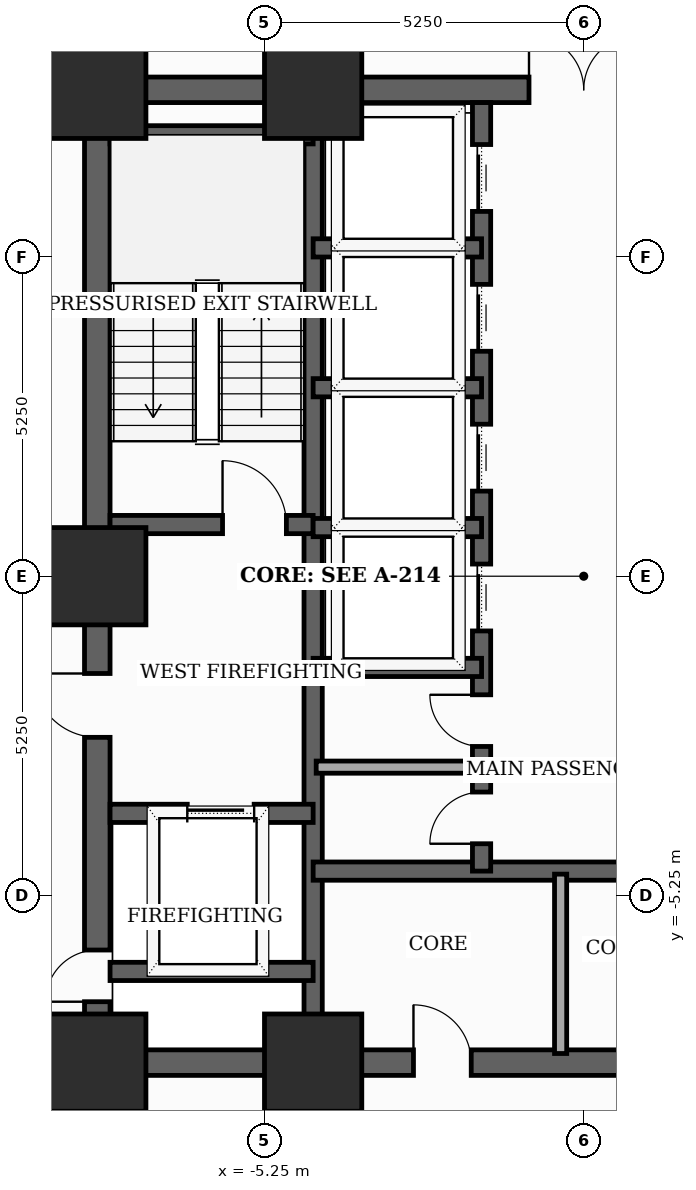
"""IFC4 building model, lengths in metres.
Left out: names, types, materials, properties, quantities, classifications, styles, units other than length and angle.
Written with IfcOpenShell. Run it as: python <this file> out.ifc"""

import sys

from ifc_helpers import new_model, si_unit, direction, frame, frame_2d, origin, origin_2d, place, context, subcontext, project, spatial, rectangle, extrude, element, fill, save


model = new_model("IFC4")
c1 = context("Model", 3, precision=1e-05, world=origin(), true_north=direction((0.0, 1.0)))
c2 = subcontext(c1, "Body", "Model", "MODEL_VIEW")
j1 = project(units=[si_unit("LENGTHUNIT", "METRE"), si_unit("PLANEANGLEUNIT", "RADIAN")], contexts=[c1])
p1 = place(None, origin())
s1 = spatial("IfcSite", under=j1, at=p1, CompositionType="ELEMENT")
p2 = place(p1, origin())
s2 = spatial("IfcBuilding", under=s1, at=p2, CompositionType="ELEMENT")
p3 = place(p2, frame((0.0, 0.0, 66.7)))
s3 = spatial("IfcBuildingStorey", under=s2, at=p3, CompositionType="ELEMENT", Elevation=66.7)
for number, where, z_axis, x_axis in (
    (1, (-8.0, -8.0, 0.0), (0.0, 0.0, 1.0), (1.0, 0.0, 0.0)),
    (2, (-4.45, -8.0, 0.0), (0.0, 0.0, 1.0), (1.0, 0.0, 0.0)),
    (3, (-4.45, 8.0, 0.0), (0.0, 0.0, 1.0), (1.0, 0.0, 0.0)),
    (4, (-8.0, 8.0, 0.0), (0.0, 0.0, 1.0), (1.0, 0.0, 0.0)),
    (5, (-8.0, 0.0, 0.0), (0.0, 0.0, 1.0), (1.0, 0.0, 0.0)),
):
    element("IfcColumn", number, at=place(p3, frame(where, z_axis=z_axis, x_axis=x_axis)), inside=s3, PredefinedType="COLUMN", context=c2, shape_type="SweptSolid", body=[
        extrude(rectangle(XDim=1.6, YDim=1.6, at=origin_2d()), origin(), (0.0, 0.0, 1.0), 3.7),
    ])
p4 = place(p3, frame((-8.0, -8.0, 0.0), z_axis=(0.0, 0.0, 1.0), x_axis=(0.0, 1.0, 0.0)))
e6 = element("IfcWall", 6, at=p4, inside=s3, PredefinedType="SHEAR", context=c2, shape_type="SweptSolid", body=[
    extrude(rectangle(XDim=16.0, YDim=0.42, at=frame_2d((8.0, 0.0))), origin(), (0.0, 0.0, 1.0), 3.5),
])
p5 = place(p4, frame((1.002, 0.0, 0.0)))
e7 = element("IfcOpeningElement", 7, at=p5, cuts=e6, PredefinedType="OPENING", context=c2, shape_type="SweptSolid", body=[
    extrude(rectangle(XDim=0.85, YDim=2.02, at=frame_2d((0.425, 1.01))), frame((0.0, 0.22, 0.0), z_axis=(0.0, -1.0, 0.0), x_axis=(1.0, 0.0, 0.0)), (0.0, 0.0, 1.0), 0.44),
])
p6 = place(p4, frame((5.35, 0.0, 0.0)))
e8 = element("IfcOpeningElement", 8, at=p6, cuts=e6, PredefinedType="OPENING", context=c2, shape_type="SweptSolid", body=[
    extrude(rectangle(XDim=1.05, YDim=2.15, at=frame_2d((0.525, 1.075))), frame((0.0, 0.22, 0.0), z_axis=(0.0, -1.0, 0.0), x_axis=(1.0, 0.0, 0.0)), (0.0, 0.0, 1.0), 0.44),
])
p7 = place(p3, frame((-8.0, -8.0, 0.0), z_axis=(0.0, 0.0, 1.0), x_axis=(1.0, 0.0, 0.0)))
e9 = element("IfcWall", 9, at=p7, inside=s3, PredefinedType="SHEAR", context=c2, shape_type="SweptSolid", body=[
    extrude(rectangle(XDim=16.0, YDim=0.42, at=frame_2d((8.0, 0.0))), origin(), (0.0, 0.0, 1.0), 3.5),
])
p8 = place(p7, frame((5.2, 0.0, 0.0)))
e10 = element("IfcOpeningElement", 10, at=p8, cuts=e9, PredefinedType="OPENING", context=c2, shape_type="SweptSolid", body=[
    extrude(rectangle(XDim=0.95, YDim=2.1, at=frame_2d((0.475, 1.05))), frame((0.0, 0.22, 0.0), z_axis=(0.0, -1.0, 0.0), x_axis=(1.0, 0.0, 0.0)), (0.0, 0.0, 1.0), 0.44),
])
p9 = place(p7, frame((9.8, 0.0, 0.0)))
e11 = element("IfcOpeningElement", 11, at=p9, cuts=e9, PredefinedType="OPENING", context=c2, shape_type="SweptSolid", body=[
    extrude(rectangle(XDim=0.95, YDim=2.1, at=frame_2d((0.475, 1.05))), frame((0.0, 0.22, 0.0), z_axis=(0.0, -1.0, 0.0), x_axis=(1.0, 0.0, 0.0)), (0.0, 0.0, 1.0), 0.44),
])
p10 = place(p3, frame((-8.0, 8.0, 0.0), z_axis=(0.0, 0.0, 1.0), x_axis=(1.0, 0.0, 0.0)))
e12 = element("IfcWall", 12, at=p10, inside=s3, PredefinedType="SHEAR", context=c2, shape_type="SweptSolid", body=[
    extrude(rectangle(XDim=16.0, YDim=0.42, at=frame_2d((8.0, 0.0))), origin(), (0.0, 0.0, 1.0), 3.5),
])
p11 = place(p10, frame((7.1, 0.0, 0.0)))
e13 = element("IfcOpeningElement", 13, at=p11, cuts=e12, PredefinedType="OPENING", context=c2, shape_type="SweptSolid", body=[
    extrude(rectangle(XDim=1.8, YDim=2.15, at=frame_2d((0.9, 1.075))), frame((0.0, 0.22, 0.0), z_axis=(0.0, -1.0, 0.0), x_axis=(1.0, 0.0, 0.0)), (0.0, 0.0, 1.0), 0.44),
])
p12 = place(p3, frame((-4.45, -7.79, 0.0), z_axis=(0.0, 0.0, 1.0), x_axis=(0.0, 1.0, 0.0)))
e14 = element("IfcWall", 14, at=p12, inside=s3, PredefinedType="SHEAR", context=c2, shape_type="SweptSolid", body=[
    extrude(rectangle(XDim=15.58, YDim=0.3, at=frame_2d((7.79, 0.0))), origin(), (0.0, 0.0, 1.0), 3.5),
])
p13 = place(p3, frame((-7.79, 0.85, 0.0), z_axis=(0.0, 0.0, 1.0), x_axis=(1.0, 0.0, 0.0)))
e15 = element("IfcWall", 15, at=p13, inside=s3, PredefinedType="SHEAR", context=c2, shape_type="SweptSolid", body=[
    extrude(rectangle(XDim=3.34, YDim=0.3, at=frame_2d((1.67, 0.0))), origin(), (0.0, 0.0, 1.0), 3.5),
])
p14 = place(p13, frame((1.85, 0.0, 0.0)))
e16 = element("IfcOpeningElement", 16, at=p14, cuts=e15, PredefinedType="OPENING", context=c2, shape_type="SweptSolid", body=[
    extrude(rectangle(XDim=1.05, YDim=2.15, at=frame_2d((0.525, 1.075))), frame((0.0, 0.16, 0.0), z_axis=(0.0, -1.0, 0.0), x_axis=(1.0, 0.0, 0.0)), (0.0, 0.0, 1.0), 0.32),
])
p15 = place(p3, frame((-7.79, 7.26, 0.0), z_axis=(0.0, 0.0, 1.0), x_axis=(1.0, 0.0, 0.0)))
e17 = element("IfcWall", 17, at=p15, inside=s3, PredefinedType="SHEAR", context=c2, shape_type="SweptSolid", body=[
    extrude(rectangle(XDim=3.34, YDim=0.3, at=frame_2d((1.67, 0.0))), origin(), (0.0, 0.0, 1.0), 3.5),
])
p16 = place(p3, frame((-7.79, -3.9, 0.0), z_axis=(0.0, 0.0, 1.0), x_axis=(1.0, 0.0, 0.0)))
e18 = element("IfcWall", 18, at=p16, inside=s3, PredefinedType="SHEAR", context=c2, shape_type="SweptSolid", body=[
    extrude(rectangle(XDim=3.34, YDim=0.3, at=frame_2d((1.67, 0.0))), origin(), (0.0, 0.0, 1.0), 3.5),
])
p17 = place(p16, frame((1.27, 0.0, 0.0)))
e19 = element("IfcOpeningElement", 19, at=p17, cuts=e18, PredefinedType="OPENING", context=c2, shape_type="SweptSolid", body=[
    extrude(rectangle(XDim=1.1, YDim=2.1, at=frame_2d((0.55, 1.05))), frame((0.0, 0.16, 0.0), z_axis=(0.0, -1.0, 0.0), x_axis=(1.0, 0.0, 0.0)), (0.0, 0.0, 1.0), 0.32),
])
p18 = place(p3, frame((-7.79, -6.5, 0.0), z_axis=(0.0, 0.0, 1.0), x_axis=(1.0, 0.0, 0.0)))
e20 = element("IfcWall", 20, at=p18, inside=s3, PredefinedType="SHEAR", context=c2, shape_type="SweptSolid", body=[
    extrude(rectangle(XDim=3.34, YDim=0.3, at=frame_2d((1.67, 0.0))), origin(), (0.0, 0.0, 1.0), 3.5),
])
p19 = place(p3, frame((-4.45, -4.85, 0.0), z_axis=(0.0, 0.0, 1.0), x_axis=(1.0, 0.0, 0.0)))
e21 = element("IfcWall", 21, at=p19, inside=s3, PredefinedType="SHEAR", context=c2, shape_type="SweptSolid", body=[
    extrude(rectangle(XDim=8.9, YDim=0.3, at=frame_2d((4.45, 0.0))), origin(), (0.0, 0.0, 1.0), 3.5),
])
p20 = place(p3, frame((-1.68, -4.85, 0.0), z_axis=(0.0, 0.0, 1.0), x_axis=(0.0, 1.0, 0.0)))
e22 = element("IfcWall", 22, at=p20, inside=s3, PredefinedType="SHEAR", context=c2, shape_type="SweptSolid", body=[
    extrude(rectangle(XDim=12.64, YDim=0.3, at=frame_2d((6.32, 0.0))), origin(), (0.0, 0.0, 1.0), 3.5),
])
p21 = place(p20, frame((3.95, 0.0, 0.0)))
e23 = element("IfcOpeningElement", 23, at=p21, cuts=e22, PredefinedType="OPENING", context=c2, shape_type="SweptSolid", body=[
    extrude(rectangle(XDim=1.1, YDim=2.1, at=frame_2d((0.55, 1.05))), frame((0.0, 0.16, 0.0), z_axis=(0.0, -1.0, 0.0), x_axis=(1.0, 0.0, 0.0)), (0.0, 0.0, 1.0), 0.32),
])
p22 = place(p20, frame((6.25, 0.0, 0.0)))
e24 = element("IfcOpeningElement", 24, at=p22, cuts=e22, PredefinedType="OPENING", context=c2, shape_type="SweptSolid", body=[
    extrude(rectangle(XDim=1.1, YDim=2.1, at=frame_2d((0.55, 1.05))), frame((0.0, 0.16, 0.0), z_axis=(0.0, -1.0, 0.0), x_axis=(1.0, 0.0, 0.0)), (0.0, 0.0, 1.0), 0.32),
])
p23 = place(p20, frame((8.55, 0.0, 0.0)))
e25 = element("IfcOpeningElement", 25, at=p23, cuts=e22, PredefinedType="OPENING", context=c2, shape_type="SweptSolid", body=[
    extrude(rectangle(XDim=1.1, YDim=2.1, at=frame_2d((0.55, 1.05))), frame((0.0, 0.16, 0.0), z_axis=(0.0, -1.0, 0.0), x_axis=(1.0, 0.0, 0.0)), (0.0, 0.0, 1.0), 0.32),
])
p24 = place(p20, frame((10.85, 0.0, 0.0)))
e26 = element("IfcOpeningElement", 26, at=p24, cuts=e22, PredefinedType="OPENING", context=c2, shape_type="SweptSolid", body=[
    extrude(rectangle(XDim=1.1, YDim=2.1, at=frame_2d((0.55, 1.05))), frame((0.0, 0.16, 0.0), z_axis=(0.0, -1.0, 0.0), x_axis=(1.0, 0.0, 0.0)), (0.0, 0.0, 1.0), 0.32),
])
p25 = place(p20, frame((0.45, 0.0, 0.0)))
e27 = element("IfcOpeningElement", 27, at=p25, cuts=e22, PredefinedType="OPENING", context=c2, shape_type="SweptSolid", body=[
    extrude(rectangle(XDim=0.85, YDim=2.02, at=frame_2d((0.425, 1.01))), frame((0.0, 0.16, 0.0), z_axis=(0.0, -1.0, 0.0), x_axis=(1.0, 0.0, 0.0)), (0.0, 0.0, 1.0), 0.32),
])
p26 = place(p20, frame((2.05, 0.0, 0.0)))
e28 = element("IfcOpeningElement", 28, at=p26, cuts=e22, PredefinedType="OPENING", context=c2, shape_type="SweptSolid", body=[
    extrude(rectangle(XDim=0.85, YDim=2.02, at=frame_2d((0.425, 1.01))), frame((0.0, 0.16, 0.0), z_axis=(0.0, -1.0, 0.0), x_axis=(1.0, 0.0, 0.0)), (0.0, 0.0, 1.0), 0.32),
])
for number, where, z_axis, x_axis in (
    (29, (-4.45, -1.5, 0.0), (0.0, 0.0, 1.0), (1.0, 0.0, 0.0)),
    (30, (-4.45, 0.8, 0.0), (0.0, 0.0, 1.0), (1.0, 0.0, 0.0)),
    (31, (-4.45, 3.1, 0.0), (0.0, 0.0, 1.0), (1.0, 0.0, 0.0)),
    (32, (-4.45, 5.4, 0.0), (0.0, 0.0, 1.0), (1.0, 0.0, 0.0)),
):
    element("IfcWall", number, at=place(p3, frame(where, z_axis=z_axis, x_axis=x_axis)), inside=s3, PredefinedType="SHEAR", context=c2, shape_type="SweptSolid", body=[
        extrude(rectangle(XDim=2.77, YDim=0.3, at=frame_2d((1.385, 0.0))), origin(), (0.0, 0.0, 1.0), 3.5),
    ])
p27 = place(p3, frame((-0.38, -7.85, 0.0), z_axis=(0.0, 0.0, 1.0), x_axis=(0.0, 1.0, 0.0)))
e33 = element("IfcWall", 33, at=p27, inside=s3, PredefinedType="SOLIDWALL", context=c2, shape_type="SweptSolid", body=[
    extrude(rectangle(XDim=2.95, YDim=0.2, at=frame_2d((1.475, 0.0))), origin(), (0.0, 0.0, 1.0), 2.885),
])
p28 = place(p3, frame((-4.4, -3.14, 0.0), z_axis=(0.0, 0.0, 1.0), x_axis=(1.0, 0.0, 0.0)))
e34 = element("IfcWall", 34, at=p28, inside=s3, PredefinedType="SOLIDWALL", context=c2, shape_type="SweptSolid", body=[
    extrude(rectangle(XDim=2.68, YDim=0.2, at=frame_2d((1.34, 0.0))), origin(), (0.0, 0.0, 1.0), 3.5),
])
p29 = place(p5, origin())
e35 = element("IfcDoor", 35, at=p29, inside=s3, OperationType="SINGLE_SWING_LEFT", PredefinedType="TRAPDOOR", context=c2, shape_type="SweptSolid", body=[
    extrude(rectangle(XDim=0.85, YDim=2.02, at=frame_2d((0.425, 1.01))), frame((0.0, 0.025, 0.0), z_axis=(0.0, -1.0, 0.0), x_axis=(1.0, 0.0, 0.0)), (0.0, 0.0, 1.0), 0.05),
])
fill(e7, e35)
p30 = place(p6, origin())
e36 = element("IfcDoor", 36, at=p30, inside=s3, OperationType="SINGLE_SWING_RIGHT", PredefinedType="DOOR", context=c2, shape_type="SweptSolid", body=[
    extrude(rectangle(XDim=1.05, YDim=2.15, at=frame_2d((0.525, 1.075))), frame((0.0, 0.025, 0.0), z_axis=(0.0, -1.0, 0.0), x_axis=(1.0, 0.0, 0.0)), (0.0, 0.0, 1.0), 0.05),
])
fill(e8, e36)
p31 = place(p8, origin())
e37 = element("IfcDoor", 37, at=p31, inside=s3, OperationType="SINGLE_SWING_LEFT", PredefinedType="DOOR", context=c2, shape_type="SweptSolid", body=[
    extrude(rectangle(XDim=0.95, YDim=2.1, at=frame_2d((0.475, 1.05))), frame((0.0, 0.025, 0.0), z_axis=(0.0, -1.0, 0.0), x_axis=(1.0, 0.0, 0.0)), (0.0, 0.0, 1.0), 0.05),
])
fill(e10, e37)
p32 = place(p11, origin())
e38 = element("IfcDoor", 38, at=p32, inside=s3, OperationType="DOUBLE_DOOR_SINGLE_SWING", PredefinedType="DOOR", context=c2, shape_type="SweptSolid", body=[
    extrude(rectangle(XDim=1.8, YDim=2.15, at=frame_2d((0.9, 1.075))), frame((0.0, 0.025, 0.0), z_axis=(0.0, -1.0, 0.0), x_axis=(1.0, 0.0, 0.0)), (0.0, 0.0, 1.0), 0.05),
])
fill(e13, e38)
p33 = place(p14, origin())
e39 = element("IfcDoor", 39, at=p33, inside=s3, OperationType="SINGLE_SWING_LEFT", PredefinedType="DOOR", context=c2, shape_type="SweptSolid", body=[
    extrude(rectangle(XDim=1.05, YDim=2.15, at=frame_2d((0.525, 1.075))), frame((0.0, 0.025, 0.0), z_axis=(0.0, -1.0, 0.0), x_axis=(1.0, 0.0, 0.0)), (0.0, 0.0, 1.0), 0.05),
])
fill(e16, e39)
p34 = place(p17, origin())
e40 = element("IfcDoor", 40, at=p34, inside=s3, OperationType="SLIDING_TO_LEFT", PredefinedType="DOOR", context=c2, shape_type="SweptSolid", body=[
    extrude(rectangle(XDim=1.1, YDim=2.1, at=frame_2d((0.55, 1.05))), frame((0.0, 0.025, 0.0), z_axis=(0.0, -1.0, 0.0), x_axis=(1.0, 0.0, 0.0)), (0.0, 0.0, 1.0), 0.05),
])
fill(e19, e40)
p35 = place(p21, origin())
e41 = element("IfcDoor", 41, at=p35, inside=s3, OperationType="SLIDING_TO_LEFT", PredefinedType="DOOR", context=c2, shape_type="SweptSolid", body=[
    extrude(rectangle(XDim=1.1, YDim=2.1, at=frame_2d((0.55, 1.05))), frame((0.0, 0.025, 0.0), z_axis=(0.0, -1.0, 0.0), x_axis=(1.0, 0.0, 0.0)), (0.0, 0.0, 1.0), 0.05),
])
fill(e23, e41)
p36 = place(p22, origin())
e42 = element("IfcDoor", 42, at=p36, inside=s3, OperationType="SLIDING_TO_LEFT", PredefinedType="DOOR", context=c2, shape_type="SweptSolid", body=[
    extrude(rectangle(XDim=1.1, YDim=2.1, at=frame_2d((0.55, 1.05))), frame((0.0, 0.025, 0.0), z_axis=(0.0, -1.0, 0.0), x_axis=(1.0, 0.0, 0.0)), (0.0, 0.0, 1.0), 0.05),
])
fill(e24, e42)
p37 = place(p23, origin())
e43 = element("IfcDoor", 43, at=p37, inside=s3, OperationType="SLIDING_TO_LEFT", PredefinedType="DOOR", context=c2, shape_type="SweptSolid", body=[
    extrude(rectangle(XDim=1.1, YDim=2.1, at=frame_2d((0.55, 1.05))), frame((0.0, 0.025, 0.0), z_axis=(0.0, -1.0, 0.0), x_axis=(1.0, 0.0, 0.0)), (0.0, 0.0, 1.0), 0.05),
])
fill(e25, e43)
p38 = place(p24, origin())
e44 = element("IfcDoor", 44, at=p38, inside=s3, OperationType="SLIDING_TO_LEFT", PredefinedType="DOOR", context=c2, shape_type="SweptSolid", body=[
    extrude(rectangle(XDim=1.1, YDim=2.1, at=frame_2d((0.55, 1.05))), frame((0.0, 0.025, 0.0), z_axis=(0.0, -1.0, 0.0), x_axis=(1.0, 0.0, 0.0)), (0.0, 0.0, 1.0), 0.05),
])
fill(e26, e44)
p39 = place(p25, origin())
e45 = element("IfcDoor", 45, at=p39, inside=s3, OperationType="SINGLE_SWING_LEFT", PredefinedType="TRAPDOOR", context=c2, shape_type="SweptSolid", body=[
    extrude(rectangle(XDim=0.85, YDim=2.02, at=frame_2d((0.425, 1.01))), frame((0.0, 0.025, 0.0), z_axis=(0.0, -1.0, 0.0), x_axis=(1.0, 0.0, 0.0)), (0.0, 0.0, 1.0), 0.05),
])
fill(e27, e45)
p40 = place(p26, origin())
e46 = element("IfcDoor", 46, at=p40, inside=s3, OperationType="SINGLE_SWING_RIGHT", PredefinedType="TRAPDOOR", context=c2, shape_type="SweptSolid", body=[
    extrude(rectangle(XDim=0.85, YDim=2.02, at=frame_2d((0.425, 1.01))), frame((0.0, 0.025, 0.0), z_axis=(0.0, -1.0, 0.0), x_axis=(1.0, 0.0, 0.0)), (0.0, 0.0, 1.0), 0.05),
])
fill(e28, e46)
save(model, sys.argv[1])
